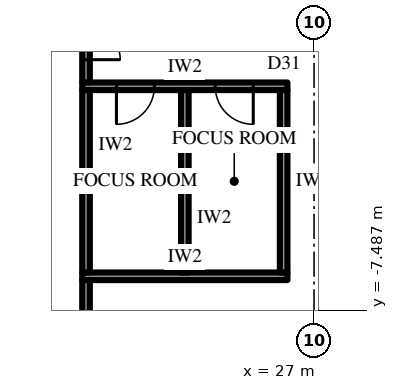
"""IFC4 building model, lengths in metres.
Left out: names, types, materials, properties, quantities, classifications, styles, units other than length and angle.
Written with IfcOpenShell. Run it as: python <this file> out.ifc"""

import sys

from ifc_helpers import new_model, si_unit, direction, frame, frame_2d, origin, place, context, subcontext, project, spatial, rectangle, extrude, element, fill, save


model = new_model("IFC4")
c1 = context("Model", 3, precision=1e-05, world=origin(), true_north=direction((0.0, 1.0)))
c2 = subcontext(c1, "Body", "Model", "MODEL_VIEW")
j1 = project(units=[si_unit("LENGTHUNIT", "METRE"), si_unit("PLANEANGLEUNIT", "RADIAN")], contexts=[c1])
p1 = place(None, origin())
s1 = spatial("IfcSite", under=j1, at=p1, CompositionType="ELEMENT")
p2 = place(p1, origin())
s2 = spatial("IfcBuilding", under=s1, at=p2, CompositionType="ELEMENT")
p3 = place(p2, frame((0.0, 0.0, 40.3)))
s3 = spatial("IfcBuildingStorey", under=s2, at=p3, CompositionType="ELEMENT", Elevation=40.3)
p4 = place(p3, frame((21.232, -30.925, 0.0), z_axis=(0.0, 0.0, 1.0), x_axis=(0.499999163675, 0.866025886636, 0.0)))
e1 = element("IfcWall", 1, at=p4, inside=s3, PredefinedType="SOLIDWALL", context=c2, shape_type="SweptSolid", body=[
    extrude(rectangle(XDim=32.332, YDim=0.3, at=frame_2d((16.166, 0.0))), origin(), (0.0, 0.0, 1.0), 2.7),
])
p5 = place(p4, frame((1.319, 0.0, 0.6)))
e2 = element("IfcOpeningElement", 2, at=p5, cuts=e1, PredefinedType="OPENING", context=c2, shape_type="SweptSolid", body=[
    extrude(rectangle(XDim=2.75, YDim=1.85, at=frame_2d((1.375, 0.925))), frame((0.0, 0.16, 0.0), z_axis=(0.0, -1.0, 0.0), x_axis=(1.0, 0.0, 0.0)), (0.0, 0.0, 1.0), 0.32),
])
p6 = place(p4, frame((6.708, 0.0, 0.6)))
e3 = element("IfcOpeningElement", 3, at=p6, cuts=e1, PredefinedType="OPENING", context=c2, shape_type="SweptSolid", body=[
    extrude(rectangle(XDim=2.75, YDim=1.85, at=frame_2d((1.375, 0.925))), frame((0.0, 0.16, 0.0), z_axis=(0.0, -1.0, 0.0), x_axis=(1.0, 0.0, 0.0)), (0.0, 0.0, 1.0), 0.32),
])
p7 = place(p4, frame((12.872, 0.0, 0.0)))
e4 = element("IfcOpeningElement", 4, at=p7, cuts=e1, PredefinedType="OPENING", context=c2, shape_type="SweptSolid", body=[
    extrude(rectangle(XDim=1.2, YDim=2.4, at=frame_2d((0.6, 1.2))), frame((0.0, 0.16, 0.0), z_axis=(0.0, -1.0, 0.0), x_axis=(1.0, 0.0, 0.0)), (0.0, 0.0, 1.0), 0.32),
])
p8 = place(p4, frame((17.485, 0.0, 0.6)))
e5 = element("IfcOpeningElement", 5, at=p8, cuts=e1, PredefinedType="OPENING", context=c2, shape_type="SweptSolid", body=[
    extrude(rectangle(XDim=2.75, YDim=1.85, at=frame_2d((1.375, 0.925))), frame((0.0, 0.16, 0.0), z_axis=(0.0, -1.0, 0.0), x_axis=(1.0, 0.0, 0.0)), (0.0, 0.0, 1.0), 0.32),
])
p9 = place(p4, frame((22.874, 0.0, 0.6)))
e6 = element("IfcOpeningElement", 6, at=p9, cuts=e1, PredefinedType="OPENING", context=c2, shape_type="SweptSolid", body=[
    extrude(rectangle(XDim=2.75, YDim=1.85, at=frame_2d((1.375, 0.925))), frame((0.0, 0.16, 0.0), z_axis=(0.0, -1.0, 0.0), x_axis=(1.0, 0.0, 0.0)), (0.0, 0.0, 1.0), 0.32),
])
p10 = place(p4, frame((28.262, 0.0, 0.6)))
e7 = element("IfcOpeningElement", 7, at=p10, cuts=e1, PredefinedType="OPENING", context=c2, shape_type="SweptSolid", body=[
    extrude(rectangle(XDim=2.75, YDim=1.85, at=frame_2d((1.375, 0.925))), frame((0.0, 0.16, 0.0), z_axis=(0.0, -1.0, 0.0), x_axis=(1.0, 0.0, 0.0)), (0.0, 0.0, 1.0), 0.32),
])
p11 = place(p3, frame((20.9, -1.6, 0.0), z_axis=(0.0, 0.0, 1.0), x_axis=(1.0, 0.0, 0.0)))
e8 = element("IfcWall", 8, at=p11, inside=s3, PredefinedType="PARTITIONING", context=c2, shape_type="SweptSolid", body=[
    extrude(rectangle(XDim=5.4, YDim=0.2, at=frame_2d((2.7, 0.0))), origin(), (0.0, 0.0, 1.0), 4.0),
])
p12 = place(p11, frame((0.9, 0.0, 0.0)))
e9 = element("IfcOpeningElement", 9, at=p12, cuts=e8, PredefinedType="OPENING", context=c2, shape_type="SweptSolid", body=[
    extrude(rectangle(XDim=1.0, YDim=2.2, at=frame_2d((0.5, 1.1))), frame((0.0, 0.11, 0.0), z_axis=(0.0, -1.0, 0.0), x_axis=(1.0, 0.0, 0.0)), (0.0, 0.0, 1.0), 0.22),
])
p13 = place(p11, frame((3.5, 0.0, 0.0)))
e10 = element("IfcOpeningElement", 10, at=p13, cuts=e8, PredefinedType="OPENING", context=c2, shape_type="SweptSolid", body=[
    extrude(rectangle(XDim=1.0, YDim=2.2, at=frame_2d((0.5, 1.1))), frame((0.0, 0.11, 0.0), z_axis=(0.0, -1.0, 0.0), x_axis=(1.0, 0.0, 0.0)), (0.0, 0.0, 1.0), 0.22),
])
p14 = place(p3, frame((20.9, -6.6, 0.0), z_axis=(0.0, 0.0, 1.0), x_axis=(1.0, 0.0, 0.0)))
e11 = element("IfcWall", 11, at=p14, inside=s3, PredefinedType="PARTITIONING", context=c2, shape_type="SweptSolid", body=[
    extrude(rectangle(XDim=5.4, YDim=0.2, at=frame_2d((2.7, 0.0))), origin(), (0.0, 0.0, 1.0), 4.0),
])
for number, where, z_axis, x_axis in (
    (12, (21.0, -1.7, 0.0), (0.0, 0.0, 1.0), (0.0, -1.0, 0.0)),
    (13, (23.6, -1.7, 0.0), (0.0, 0.0, 1.0), (0.0, -1.0, 0.0)),
    (14, (26.2, -1.7, 0.0), (0.0, 0.0, 1.0), (0.0, -1.0, 0.0)),
):
    element("IfcWall", number, at=place(p3, frame(where, z_axis=z_axis, x_axis=x_axis)), inside=s3, PredefinedType="PARTITIONING", context=c2, shape_type="SweptSolid", body=[
        extrude(rectangle(XDim=4.8, YDim=0.2, at=frame_2d((2.4, 0.0))), origin(), (0.0, 0.0, 1.0), 4.0),
    ])
p15 = place(p3, frame((21.0, -6.701, 0.0), z_axis=(0.0, 0.0, 1.0), x_axis=(0.0, -1.0, 0.0)))
e15 = element("IfcWall", 15, at=p15, inside=s3, PredefinedType="PARTITIONING", context=c2, shape_type="SweptSolid", body=[
    extrude(rectangle(XDim=5.599, YDim=0.2, at=frame_2d((2.8, 0.0))), origin(), (0.0, 0.0, 1.0), 4.0),
])
p16 = place(p3, frame((21.0, 1.499, 0.0), z_axis=(0.0, 0.0, 1.0), x_axis=(0.0, -1.0, 0.0)))
e16 = element("IfcWall", 16, at=p16, inside=s3, PredefinedType="PARTITIONING", context=c2, shape_type="SweptSolid", body=[
    extrude(rectangle(XDim=2.998, YDim=0.2, at=frame_2d((1.499, 0.0))), origin(), (0.0, 0.0, 1.0), 4.0),
])
p17 = place(p16, frame((0.599, 0.0, 0.0)))
e17 = element("IfcOpeningElement", 17, at=p17, cuts=e16, PredefinedType="OPENING", context=c2, shape_type="SweptSolid", body=[
    extrude(rectangle(XDim=1.8, YDim=2.4, at=frame_2d((0.9, 1.2))), frame((0.0, 0.11, 0.0), z_axis=(0.0, -1.0, 0.0), x_axis=(1.0, 0.0, 0.0)), (0.0, 0.0, 1.0), 0.22),
])
p18 = place(p12, frame((1.0, 0.0, 0.0), z_axis=(0.0, 0.0, 1.0), x_axis=(-1.0, 0.0, 0.0)))
e18 = element("IfcDoor", 18, at=p18, inside=s3, OperationType="SINGLE_SWING_LEFT", PredefinedType="DOOR", context=c2, shape_type="SweptSolid", body=[
    extrude(rectangle(XDim=1.0, YDim=2.2, at=frame_2d((0.5, 1.1))), frame((0.0, 0.025, 0.0), z_axis=(0.0, -1.0, 0.0), x_axis=(1.0, 0.0, 0.0)), (0.0, 0.0, 1.0), 0.05),
])
fill(e9, e18)
p19 = place(p13, frame((1.0, 0.0, 0.0), z_axis=(0.0, 0.0, 1.0), x_axis=(-1.0, 0.0, 0.0)))
e19 = element("IfcDoor", 19, at=p19, inside=s3, OperationType="SINGLE_SWING_RIGHT", PredefinedType="DOOR", context=c2, shape_type="SweptSolid", body=[
    extrude(rectangle(XDim=1.0, YDim=2.2, at=frame_2d((0.5, 1.1))), frame((0.0, 0.025, 0.0), z_axis=(0.0, -1.0, 0.0), x_axis=(1.0, 0.0, 0.0)), (0.0, 0.0, 1.0), 0.05),
])
fill(e10, e19)
p20 = place(p17, origin())
e20 = element("IfcDoor", 20, at=p20, inside=s3, OperationType="DOUBLE_DOOR_SINGLE_SWING", PredefinedType="DOOR", context=c2, shape_type="SweptSolid", body=[
    extrude(rectangle(XDim=1.8, YDim=2.4, at=frame_2d((0.9, 1.2))), frame((0.0, 0.025, 0.0), z_axis=(0.0, -1.0, 0.0), x_axis=(1.0, 0.0, 0.0)), (0.0, 0.0, 1.0), 0.05),
])
fill(e17, e20)
save(model, sys.argv[1])
